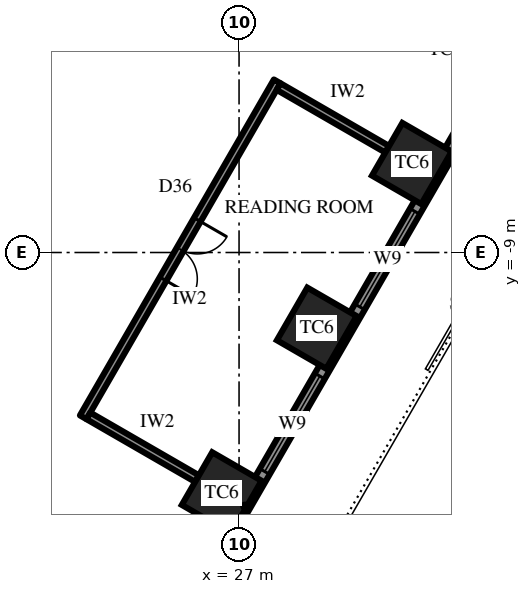
"""IFC4 building model, lengths in metres.
Left out: names, types, materials, properties, quantities, classifications, styles, units other than length and angle.
Written with IfcOpenShell. Run it as: python <this file> out.ifc"""

import sys

from ifc_helpers import new_model, si_unit, direction, frame, frame_2d, origin, origin_2d, place, context, subcontext, project, spatial, rectangle, extrude, element, fill, save


model = new_model("IFC4")
c1 = context("Model", 3, precision=1e-05, world=origin(), true_north=direction((0.0, 1.0)))
c2 = subcontext(c1, "Body", "Model", "MODEL_VIEW")
j1 = project(units=[si_unit("LENGTHUNIT", "METRE"), si_unit("PLANEANGLEUNIT", "RADIAN")], contexts=[c1])
p1 = place(None, origin())
s1 = spatial("IfcSite", under=j1, at=p1, CompositionType="ELEMENT")
p2 = place(p1, origin())
s2 = spatial("IfcBuilding", under=s1, at=p2, CompositionType="ELEMENT")
p3 = place(p2, frame((0.0, 0.0, 157.3)))
s3 = spatial("IfcBuildingStorey", under=s2, at=p3, CompositionType="ELEMENT", Elevation=157.3)
for number, where, z_axis, x_axis in (
    (1, (26.544, -15.325, 0.0), (0.0, 0.0, 1.0), (0.5, 0.866, 0.0)),
    (2, (29.045, -10.992, 0.0), (0.0, 0.0, 1.0), (0.5, 0.866, 0.0)),
    (3, (31.547, -6.658, 0.0), (0.0, 0.0, 1.0), (0.5, 0.866, 0.0)),
):
    element("IfcColumn", number, at=place(p3, frame(where, z_axis=z_axis, x_axis=x_axis)), inside=s3, PredefinedType="COLUMN", context=c2, shape_type="SweptSolid", body=[
        extrude(rectangle(XDim=1.6, YDim=1.5, at=origin_2d()), origin(), (0.0, 0.0, 1.0), 4.2),
    ])
p4 = place(p3, frame((19.644, -28.675, 0.0), z_axis=(0.0, 0.0, 1.0), x_axis=(0.500003084452, 0.866023622968, 0.0)))
e4 = element("IfcWall", 4, at=p4, inside=s3, PredefinedType="SOLIDWALL", context=c2, shape_type="SweptSolid", body=[
    extrude(rectangle(XDim=30.022, YDim=0.3, at=frame_2d((15.011, 0.0))), origin(), (0.0, 0.0, 1.0), 2.75),
])
p5 = place(p4, frame((1.052, 0.0, 0.6)))
e5 = element("IfcOpeningElement", 5, at=p5, cuts=e4, PredefinedType="OPENING", context=c2, shape_type="SweptSolid", body=[
    extrude(rectangle(XDim=2.9, YDim=1.9, at=frame_2d((1.45, 0.95))), frame((0.0, 0.16, 0.0), z_axis=(0.0, -1.0, 0.0), x_axis=(1.0, 0.0, 0.0)), (0.0, 0.0, 1.0), 0.32),
])
p6 = place(p4, frame((6.056, 0.0, 0.6)))
e6 = element("IfcOpeningElement", 6, at=p6, cuts=e4, PredefinedType="OPENING", context=c2, shape_type="SweptSolid", body=[
    extrude(rectangle(XDim=2.9, YDim=1.9, at=frame_2d((1.45, 0.95))), frame((0.0, 0.16, 0.0), z_axis=(0.0, -1.0, 0.0), x_axis=(1.0, 0.0, 0.0)), (0.0, 0.0, 1.0), 0.32),
])
p7 = place(p4, frame((11.909, 0.0, 0.0)))
e7 = element("IfcOpeningElement", 7, at=p7, cuts=e4, PredefinedType="OPENING", context=c2, shape_type="SweptSolid", body=[
    extrude(rectangle(XDim=1.2, YDim=2.4, at=frame_2d((0.6, 1.2))), frame((0.0, 0.16, 0.0), z_axis=(0.0, -1.0, 0.0), x_axis=(1.0, 0.0, 0.0)), (0.0, 0.0, 1.0), 0.32),
])
p8 = place(p4, frame((16.063, 0.0, 0.6)))
e8 = element("IfcOpeningElement", 8, at=p8, cuts=e4, PredefinedType="OPENING", context=c2, shape_type="SweptSolid", body=[
    extrude(rectangle(XDim=2.9, YDim=1.9, at=frame_2d((1.45, 0.95))), frame((0.0, 0.16, 0.0), z_axis=(0.0, -1.0, 0.0), x_axis=(1.0, 0.0, 0.0)), (0.0, 0.0, 1.0), 0.32),
])
p9 = place(p4, frame((21.067, 0.0, 0.6)))
e9 = element("IfcOpeningElement", 9, at=p9, cuts=e4, PredefinedType="OPENING", context=c2, shape_type="SweptSolid", body=[
    extrude(rectangle(XDim=2.9, YDim=1.9, at=frame_2d((1.45, 0.95))), frame((0.0, 0.16, 0.0), z_axis=(0.0, -1.0, 0.0), x_axis=(1.0, 0.0, 0.0)), (0.0, 0.0, 1.0), 0.32),
])
p10 = place(p4, frame((26.07, 0.0, 0.6)))
e10 = element("IfcOpeningElement", 10, at=p10, cuts=e4, PredefinedType="OPENING", context=c2, shape_type="SweptSolid", body=[
    extrude(rectangle(XDim=2.9, YDim=1.9, at=frame_2d((1.45, 0.95))), frame((0.0, 0.16, 0.0), z_axis=(0.0, -1.0, 0.0), x_axis=(1.0, 0.0, 0.0)), (0.0, 0.0, 1.0), 0.32),
])
p11 = place(p3, frame((22.9, -13.337, 0.0), z_axis=(0.0, 0.0, 1.0), x_axis=(0.500005407604, 0.86602228168, 0.0)))
e11 = element("IfcWall", 11, at=p11, inside=s3, PredefinedType="PARTITIONING", context=c2, shape_type="SweptSolid", body=[
    extrude(rectangle(XDim=10.208, YDim=0.2, at=frame_2d((5.104, 0.0))), origin(), (0.0, 0.0, 1.0), 4.0),
])
p12 = place(p11, frame((4.204, 0.0, 0.0)))
e12 = element("IfcOpeningElement", 12, at=p12, cuts=e11, PredefinedType="OPENING", context=c2, shape_type="SweptSolid", body=[
    extrude(rectangle(XDim=1.8, YDim=2.4, at=frame_2d((0.9, 1.2))), frame((0.0, 0.11, 0.0), z_axis=(0.0, -1.0, 0.0), x_axis=(1.0, 0.0, 0.0)), (0.0, 0.0, 1.0), 0.22),
])
p13 = place(p3, frame((23.036, -13.3, 0.0), z_axis=(0.0, 0.0, 1.0), x_axis=(0.866021716278, -0.500006386895, 0.0)))
e13 = element("IfcWall", 13, at=p13, inside=s3, PredefinedType="PARTITIONING", context=c2, shape_type="SweptSolid", body=[
    extrude(rectangle(XDim=3.3, YDim=0.2, at=frame_2d((1.65, 0.0))), origin(), (0.0, 0.0, 1.0), 4.0),
])
p14 = place(p3, frame((28.04, -4.633, 0.0), z_axis=(0.0, 0.0, 1.0), x_axis=(0.866008176907, -0.50002983664, 0.0)))
e14 = element("IfcWall", 14, at=p14, inside=s3, PredefinedType="PARTITIONING", context=c2, shape_type="SweptSolid", body=[
    extrude(rectangle(XDim=3.3, YDim=0.2, at=frame_2d((1.65, 0.0))), origin(), (0.0, 0.0, 1.0), 3.082),
])
p15 = place(p8, origin())
e15 = element("IfcWindow", 15, at=p15, inside=s3, PartitioningType="SINGLE_PANEL", PredefinedType="WINDOW", context=c2, shape_type="SweptSolid", body=[
    extrude(rectangle(XDim=2.9, YDim=1.9, at=frame_2d((1.45, 0.95))), frame((0.0, 0.03, 0.0), z_axis=(0.0, -1.0, 0.0), x_axis=(1.0, 0.0, 0.0)), (0.0, 0.0, 1.0), 0.06),
])
fill(e8, e15)
p16 = place(p9, origin())
e16 = element("IfcWindow", 16, at=p16, inside=s3, PartitioningType="SINGLE_PANEL", PredefinedType="WINDOW", context=c2, shape_type="SweptSolid", body=[
    extrude(rectangle(XDim=2.9, YDim=1.9, at=frame_2d((1.45, 0.95))), frame((0.0, 0.03, 0.0), z_axis=(0.0, -1.0, 0.0), x_axis=(1.0, 0.0, 0.0)), (0.0, 0.0, 1.0), 0.06),
])
fill(e9, e16)
p17 = place(p12, frame((1.8, 0.0, 0.0), z_axis=(0.0, 0.0, 1.0), x_axis=(-1.0, 0.0, 0.0)))
e17 = element("IfcDoor", 17, at=p17, inside=s3, OperationType="DOUBLE_DOOR_SINGLE_SWING", PredefinedType="DOOR", context=c2, shape_type="SweptSolid", body=[
    extrude(rectangle(XDim=1.8, YDim=2.4, at=frame_2d((0.9, 1.2))), frame((0.0, 0.025, 0.0), z_axis=(0.0, -1.0, 0.0), x_axis=(1.0, 0.0, 0.0)), (0.0, 0.0, 1.0), 0.05),
])
fill(e12, e17)
save(model, sys.argv[1])
